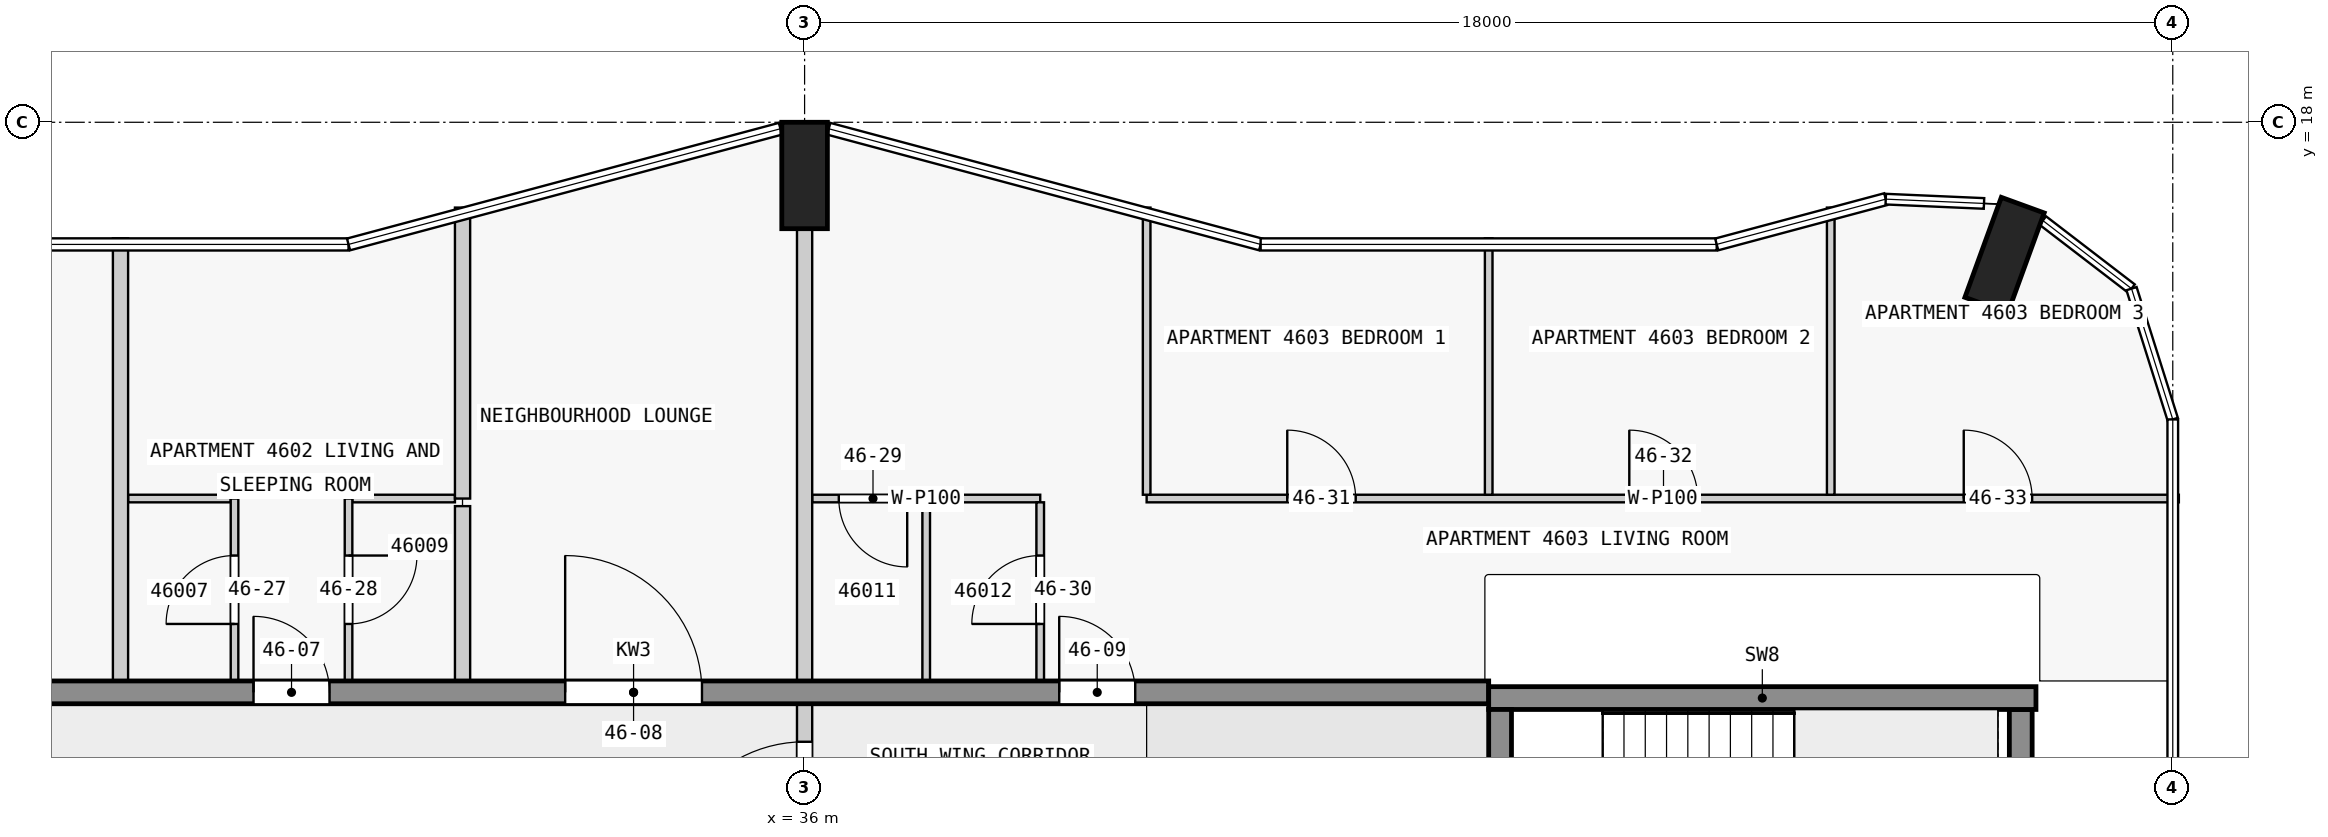
"""IFC4 building model, lengths in metres.
Left out: names, types, materials, properties, quantities, classifications, styles, units other than length and angle.
Written with IfcOpenShell. Run it as: python <this file> out.ifc"""

import sys

from ifc_helpers import new_model, si_unit, direction, frame, frame_2d, origin, origin_2d, place, context, subcontext, project, spatial, rectangle, extrude, element, fill, save


model = new_model("IFC4")
c1 = context("Model", 3, precision=1e-05, world=origin(), true_north=direction((0.0, 1.0)))
c2 = subcontext(c1, "Body", "Model", "MODEL_VIEW")
j1 = project(units=[si_unit("LENGTHUNIT", "METRE"), si_unit("PLANEANGLEUNIT", "RADIAN")], contexts=[c1])
p1 = place(None, origin())
s1 = spatial("IfcSite", under=j1, at=p1, CompositionType="ELEMENT")
p2 = place(p1, origin())
s2 = spatial("IfcBuilding", under=s1, at=p2, CompositionType="ELEMENT")
p3 = place(p2, frame((0.0, 0.0, 177.9)))
s3 = spatial("IfcBuildingStorey", under=s2, at=p3, CompositionType="ELEMENT", Elevation=177.9)
for number, where, z_axis, x_axis in (
    (1, (51.787, 16.252, 0.0), (0.0, 0.0, 1.0), (-0.94, 0.342, 0.0)),
    (2, (36.0, 17.3, 0.0), (0.0, 0.0, 1.0), (1.0, 0.0, 0.0)),
):
    element("IfcColumn", number, at=place(p3, frame(where, z_axis=z_axis, x_axis=x_axis)), inside=s3, PredefinedType="COLUMN", context=c2, shape_type="SweptSolid", body=[
        extrude(rectangle(XDim=0.6, YDim=1.4, at=origin_2d()), origin(), (0.0, 0.0, 1.0), 3.5),
    ])
p4 = place(p3, frame((45.15, 7.725, 0.0), z_axis=(0.0, 0.0, 1.0), x_axis=(0.0, 1.0, 0.0)))
e3 = element("IfcWall", 3, at=p4, inside=s3, PredefinedType="SHEAR", context=c2, shape_type="SweptSolid", body=[
    extrude(rectangle(XDim=2.55, YDim=0.3, at=frame_2d((1.275, 0.0))), origin(), (0.0, 0.0, 1.0), 3.5),
])
p5 = place(p4, frame((0.725, 0.0, 0.0)))
e4 = element("IfcOpeningElement", 4, at=p5, cuts=e3, PredefinedType="OPENING", context=c2, shape_type="SweptSolid", body=[
    extrude(rectangle(XDim=1.1, YDim=2.1, at=frame_2d((0.55, 1.05))), frame((0.0, 0.16, 0.0), z_axis=(0.0, -1.0, 0.0), x_axis=(1.0, 0.0, 0.0)), (0.0, 0.0, 1.0), 0.32),
])
p6 = place(p3, frame((52.0, 7.725, 0.0), z_axis=(0.0, 0.0, 1.0), x_axis=(0.0, 1.0, 0.0)))
e5 = element("IfcWall", 5, at=p6, inside=s3, PredefinedType="SHEAR", context=c2, shape_type="SweptSolid", body=[
    extrude(rectangle(XDim=2.55, YDim=0.3, at=frame_2d((1.275, 0.0))), origin(), (0.0, 0.0, 1.0), 3.5),
])
p7 = place(p3, frame((45.0, 10.425, 0.0), z_axis=(0.0, 0.0, 1.0), x_axis=(1.0, 0.0, 0.0)))
e6 = element("IfcWall", 6, at=p7, inside=s3, PredefinedType="SHEAR", context=c2, shape_type="SweptSolid", body=[
    extrude(rectangle(XDim=7.2, YDim=0.3, at=frame_2d((3.6, 0.0))), origin(), (0.0, 0.0, 1.0), 3.5),
])
p8 = place(p3, frame((22.5, 10.5, 0.0), z_axis=(0.0, 0.0, 1.0), x_axis=(1.0, 0.0, 0.0)))
e7 = element("IfcWall", 7, at=p8, inside=s3, PredefinedType="SHEAR", context=c2, shape_type="SweptSolid", body=[
    extrude(rectangle(XDim=22.5, YDim=0.3, at=frame_2d((11.25, 0.0))), origin(), (0.0, 0.0, 1.0), 3.25),
])
p9 = place(p8, frame((1.85, 0.0, 0.0)))
e8 = element("IfcOpeningElement", 8, at=p9, cuts=e7, PredefinedType="OPENING", context=c2, shape_type="SweptSolid", body=[
    extrude(rectangle(XDim=0.9, YDim=2.1, at=frame_2d((0.45, 1.05))), frame((0.0, 0.16, 0.0), z_axis=(0.0, -1.0, 0.0), x_axis=(1.0, 0.0, 0.0)), (0.0, 0.0, 1.0), 0.32),
])
p10 = place(p8, frame((6.25, 0.0, 0.0)))
e9 = element("IfcOpeningElement", 9, at=p10, cuts=e7, PredefinedType="OPENING", context=c2, shape_type="SweptSolid", body=[
    extrude(rectangle(XDim=1.0, YDim=2.1, at=frame_2d((0.5, 1.05))), frame((0.0, 0.16, 0.0), z_axis=(0.0, -1.0, 0.0), x_axis=(1.0, 0.0, 0.0)), (0.0, 0.0, 1.0), 0.32),
])
p11 = place(p8, frame((10.35, 0.0, 0.0)))
e10 = element("IfcOpeningElement", 10, at=p11, cuts=e7, PredefinedType="OPENING", context=c2, shape_type="SweptSolid", body=[
    extrude(rectangle(XDim=1.8, YDim=2.1, at=frame_2d((0.9, 1.05))), frame((0.0, 0.16, 0.0), z_axis=(0.0, -1.0, 0.0), x_axis=(1.0, 0.0, 0.0)), (0.0, 0.0, 1.0), 0.32),
])
p12 = place(p8, frame((16.85, 0.0, 0.0)))
e11 = element("IfcOpeningElement", 11, at=p12, cuts=e7, PredefinedType="OPENING", context=c2, shape_type="SweptSolid", body=[
    extrude(rectangle(XDim=1.0, YDim=2.1, at=frame_2d((0.5, 1.05))), frame((0.0, 0.16, 0.0), z_axis=(0.0, -1.0, 0.0), x_axis=(1.0, 0.0, 0.0)), (0.0, 0.0, 1.0), 0.32),
])
for number, where, z_axis, x_axis in (
    (12, (28.45, 13.05, 0.0), (0.0, 0.0, 1.0), (-1.0, 0.0, 0.0)),
    (13, (31.4, 13.05, 0.0), (0.0, 0.0, 1.0), (-1.0, 0.0, 0.0)),
):
    element("IfcWall", number, at=place(p3, frame(where, z_axis=z_axis, x_axis=x_axis)), inside=s3, PredefinedType="PARTITIONING", context=c2, shape_type="SweptSolid", body=[
        extrude(rectangle(XDim=1.35, YDim=0.1, at=frame_2d((0.675, 0.0))), origin(), (0.0, 0.0, 1.0), 3.25),
    ])
p13 = place(p3, frame((39.1, 13.05, 0.0), z_axis=(0.0, 0.0, 1.0), x_axis=(-1.0, 0.0, 0.0)))
e14 = element("IfcWall", 14, at=p13, inside=s3, PredefinedType="PARTITIONING", context=c2, shape_type="SweptSolid", body=[
    extrude(rectangle(XDim=3.0, YDim=0.1, at=frame_2d((1.5, 0.0))), origin(), (0.0, 0.0, 1.0), 3.25),
])
p14 = place(p13, frame((1.75, 0.0, 0.0)))
e15 = element("IfcOpeningElement", 15, at=p14, cuts=e14, PredefinedType="OPENING", context=c2, shape_type="SweptSolid", body=[
    extrude(rectangle(XDim=0.9, YDim=2.1, at=frame_2d((0.45, 1.05))), frame((0.0, 0.06, 0.0), z_axis=(0.0, -1.0, 0.0), x_axis=(1.0, 0.0, 0.0)), (0.0, 0.0, 1.0), 0.12),
])
p15 = place(p3, frame((40.5, 13.05, 0.0), z_axis=(0.0, 0.0, 1.0), x_axis=(1.0, 0.0, 0.0)))
e16 = element("IfcWall", 16, at=p15, inside=s3, PredefinedType="PARTITIONING", context=c2, shape_type="SweptSolid", body=[
    extrude(rectangle(XDim=13.58, YDim=0.1, at=frame_2d((6.79, 0.0))), origin(), (0.0, 0.0, 1.0), 3.25),
])
p16 = place(p15, frame((1.85, 0.0, 0.0)))
e17 = element("IfcOpeningElement", 17, at=p16, cuts=e16, PredefinedType="OPENING", context=c2, shape_type="SweptSolid", body=[
    extrude(rectangle(XDim=0.9, YDim=2.1, at=frame_2d((0.45, 1.05))), frame((0.0, 0.06, 0.0), z_axis=(0.0, -1.0, 0.0), x_axis=(1.0, 0.0, 0.0)), (0.0, 0.0, 1.0), 0.12),
])
p17 = place(p15, frame((6.35, 0.0, 0.0)))
e18 = element("IfcOpeningElement", 18, at=p17, cuts=e16, PredefinedType="OPENING", context=c2, shape_type="SweptSolid", body=[
    extrude(rectangle(XDim=0.9, YDim=2.1, at=frame_2d((0.45, 1.05))), frame((0.0, 0.06, 0.0), z_axis=(0.0, -1.0, 0.0), x_axis=(1.0, 0.0, 0.0)), (0.0, 0.0, 1.0), 0.12),
])
p18 = place(p15, frame((10.75, 0.0, 0.0)))
e19 = element("IfcOpeningElement", 19, at=p18, cuts=e16, PredefinedType="OPENING", context=c2, shape_type="SweptSolid", body=[
    extrude(rectangle(XDim=0.9, YDim=2.1, at=frame_2d((0.45, 1.05))), frame((0.0, 0.06, 0.0), z_axis=(0.0, -1.0, 0.0), x_axis=(1.0, 0.0, 0.0)), (0.0, 0.0, 1.0), 0.12),
])
p19 = place(p3, frame((27.0, 10.65, 0.0), z_axis=(0.0, 0.0, 1.0), x_axis=(0.0, 1.0, 0.0)))
e20 = element("IfcWall", 20, at=p19, inside=s3, PredefinedType="PARTITIONING", context=c2, shape_type="SweptSolid", body=[
    extrude(rectangle(XDim=5.823, YDim=0.2, at=frame_2d((2.912, 0.0))), origin(), (0.0, 0.0, 1.0), 3.25),
])
p20 = place(p3, frame((28.5, 10.65, 0.0), z_axis=(0.0, 0.0, 1.0), x_axis=(0.0, 1.0, 0.0)))
e21 = element("IfcWall", 21, at=p20, inside=s3, PredefinedType="PARTITIONING", context=c2, shape_type="SweptSolid", body=[
    extrude(rectangle(XDim=2.4, YDim=0.1, at=frame_2d((1.2, 0.0))), origin(), (0.0, 0.0, 1.0), 3.25),
])
p21 = place(p20, frame((0.75, 0.0, 0.0)))
e22 = element("IfcOpeningElement", 22, at=p21, cuts=e21, PredefinedType="OPENING", context=c2, shape_type="SweptSolid", body=[
    extrude(rectangle(XDim=0.9, YDim=2.1, at=frame_2d((0.45, 1.05))), frame((0.0, 0.06, 0.0), z_axis=(0.0, -1.0, 0.0), x_axis=(1.0, 0.0, 0.0)), (0.0, 0.0, 1.0), 0.12),
])
p22 = place(p3, frame((30.0, 13.05, 0.0), z_axis=(0.0, 0.0, 1.0), x_axis=(0.0, -1.0, 0.0)))
e23 = element("IfcWall", 23, at=p22, inside=s3, PredefinedType="PARTITIONING", context=c2, shape_type="SweptSolid", body=[
    extrude(rectangle(XDim=2.4, YDim=0.1, at=frame_2d((1.2, 0.0))), origin(), (0.0, 0.0, 1.0), 3.25),
])
p23 = place(p22, frame((0.75, 0.0, 0.0)))
e24 = element("IfcOpeningElement", 24, at=p23, cuts=e23, PredefinedType="OPENING", context=c2, shape_type="SweptSolid", body=[
    extrude(rectangle(XDim=0.9, YDim=2.1, at=frame_2d((0.45, 1.05))), frame((0.0, 0.06, 0.0), z_axis=(0.0, -1.0, 0.0), x_axis=(1.0, 0.0, 0.0)), (0.0, 0.0, 1.0), 0.12),
])
p24 = place(p3, frame((31.5, 16.878, 0.0), z_axis=(0.0, 0.0, 1.0), x_axis=(0.0, -1.0, 0.0)))
e25 = element("IfcWall", 25, at=p24, inside=s3, PredefinedType="PARTITIONING", context=c2, shape_type="SweptSolid", body=[
    extrude(rectangle(XDim=3.828, YDim=0.2, at=frame_2d((1.914, 0.0))), origin(), (0.0, 0.0, 1.0), 3.25),
])
p25 = place(p3, frame((31.5, 10.65, 0.0), z_axis=(0.0, 0.0, 1.0), x_axis=(0.0, 1.0, 0.0)))
e26 = element("IfcWall", 26, at=p25, inside=s3, PredefinedType="PARTITIONING", context=c2, shape_type="SweptSolid", body=[
    extrude(rectangle(XDim=2.3, YDim=0.2, at=frame_2d((1.15, 0.0))), origin(), (0.0, 0.0, 1.0), 3.25),
])
p26 = place(p3, frame((36.0, 10.65, 0.0), z_axis=(0.0, 0.0, 1.0), x_axis=(0.0, 1.0, 0.0)))
e27 = element("IfcWall", 27, at=p26, inside=s3, PredefinedType="PARTITIONING", context=c2, shape_type="SweptSolid", body=[
    extrude(rectangle(XDim=5.95, YDim=0.2, at=frame_2d((2.975, 0.0))), origin(), (0.0, 0.0, 1.0), 3.25),
])
p27 = place(p3, frame((37.6, 10.65, 0.0), z_axis=(0.0, 0.0, 1.0), x_axis=(0.0, 1.0, 0.0)))
e28 = element("IfcWall", 28, at=p27, inside=s3, PredefinedType="PARTITIONING", context=c2, shape_type="SweptSolid", body=[
    extrude(rectangle(XDim=2.35, YDim=0.1, at=frame_2d((1.175, 0.0))), origin(), (0.0, 0.0, 1.0), 3.25),
])
p28 = place(p3, frame((39.1, 10.65, 0.0), z_axis=(0.0, 0.0, 1.0), x_axis=(0.0, 1.0, 0.0)))
e29 = element("IfcWall", 29, at=p28, inside=s3, PredefinedType="PARTITIONING", context=c2, shape_type="SweptSolid", body=[
    extrude(rectangle(XDim=2.35, YDim=0.1, at=frame_2d((1.175, 0.0))), origin(), (0.0, 0.0, 1.0), 3.25),
])
p29 = place(p28, frame((0.75, 0.0, 0.0)))
e30 = element("IfcOpeningElement", 30, at=p29, cuts=e29, PredefinedType="OPENING", context=c2, shape_type="SweptSolid", body=[
    extrude(rectangle(XDim=0.9, YDim=2.1, at=frame_2d((0.45, 1.05))), frame((0.0, 0.06, 0.0), z_axis=(0.0, -1.0, 0.0), x_axis=(1.0, 0.0, 0.0)), (0.0, 0.0, 1.0), 0.12),
])
p30 = place(p3, frame((40.5, 16.878, 0.0), z_axis=(0.0, 0.0, 1.0), x_axis=(0.0, -1.0, 0.0)))
e31 = element("IfcWall", 31, at=p30, inside=s3, PredefinedType="PARTITIONING", context=c2, shape_type="SweptSolid", body=[
    extrude(rectangle(XDim=3.778, YDim=0.1, at=frame_2d((1.889, 0.0))), origin(), (0.0, 0.0, 1.0), 3.25),
])
p31 = place(p3, frame((45.0, 13.1, 0.0), z_axis=(0.0, 0.0, 1.0), x_axis=(0.0, 1.0, 0.0)))
e32 = element("IfcWall", 32, at=p31, inside=s3, PredefinedType="PARTITIONING", context=c2, shape_type="SweptSolid", body=[
    extrude(rectangle(XDim=3.373, YDim=0.1, at=frame_2d((1.687, 0.0))), origin(), (0.0, 0.0, 1.0), 3.25),
])
p32 = place(p3, frame((49.5, 13.1, 0.0), z_axis=(0.0, 0.0, 1.0), x_axis=(0.0, 1.0, 0.0)))
e33 = element("IfcWall", 33, at=p32, inside=s3, PredefinedType="PARTITIONING", context=c2, shape_type="SweptSolid", body=[
    extrude(rectangle(XDim=3.778, YDim=0.1, at=frame_2d((1.889, 0.0))), origin(), (0.0, 0.0, 1.0), 3.25),
])
p33 = place(p3, frame((36.0, 7.35, 0.0), z_axis=(0.0, 0.0, 1.0), x_axis=(0.0, 1.0, 0.0)))
e34 = element("IfcWall", 34, at=p33, inside=s3, PredefinedType="PARTITIONING", context=c2, shape_type="SweptSolid", body=[
    extrude(rectangle(XDim=3.2, YDim=0.2, at=frame_2d((1.6, 0.0))), origin(), (0.0, 0.0, 1.0), 3.25),
])
p34 = place(p33, frame((0.7, 0.0, 0.0)))
e35 = element("IfcOpeningElement", 35, at=p34, cuts=e34, PredefinedType="OPENING", context=c2, shape_type="SweptSolid", body=[
    extrude(rectangle(XDim=1.8, YDim=2.1, at=frame_2d((0.9, 1.05))), frame((0.0, 0.11, 0.0), z_axis=(0.0, -1.0, 0.0), x_axis=(1.0, 0.0, 0.0)), (0.0, 0.0, 1.0), 0.22),
])
p35 = place(p10, origin())
e36 = element("IfcDoor", 36, at=p35, inside=s3, OperationType="SINGLE_SWING_LEFT", PredefinedType="DOOR", context=c2, shape_type="SweptSolid", body=[
    extrude(rectangle(XDim=1.0, YDim=2.1, at=frame_2d((0.5, 1.05))), frame((0.0, 0.025, 0.0), z_axis=(0.0, -1.0, 0.0), x_axis=(1.0, 0.0, 0.0)), (0.0, 0.0, 1.0), 0.05),
])
fill(e9, e36)
p36 = place(p11, origin())
e37 = element("IfcDoor", 37, at=p36, inside=s3, OperationType="SINGLE_SWING_LEFT", PredefinedType="DOOR", context=c2, shape_type="SweptSolid", body=[
    extrude(rectangle(XDim=1.8, YDim=2.1, at=frame_2d((0.9, 1.05))), frame((0.0, 0.025, 0.0), z_axis=(0.0, -1.0, 0.0), x_axis=(1.0, 0.0, 0.0)), (0.0, 0.0, 1.0), 0.05),
])
fill(e10, e37)
p37 = place(p12, origin())
e38 = element("IfcDoor", 38, at=p37, inside=s3, OperationType="SINGLE_SWING_RIGHT", PredefinedType="DOOR", context=c2, shape_type="SweptSolid", body=[
    extrude(rectangle(XDim=1.0, YDim=2.1, at=frame_2d((0.5, 1.05))), frame((0.0, 0.025, 0.0), z_axis=(0.0, -1.0, 0.0), x_axis=(1.0, 0.0, 0.0)), (0.0, 0.0, 1.0), 0.05),
])
fill(e11, e38)
p38 = place(p34, origin())
e39 = element("IfcDoor", 39, at=p38, inside=s3, OperationType="SINGLE_SWING_LEFT", PredefinedType="DOOR", context=c2, shape_type="SweptSolid", body=[
    extrude(rectangle(XDim=1.8, YDim=2.1, at=frame_2d((0.9, 1.05))), frame((0.0, 0.025, 0.0), z_axis=(0.0, -1.0, 0.0), x_axis=(1.0, 0.0, 0.0)), (0.0, 0.0, 1.0), 0.05),
])
fill(e35, e39)
p39 = place(p21, origin())
e40 = element("IfcDoor", 40, at=p39, inside=s3, OperationType="SINGLE_SWING_LEFT", PredefinedType="DOOR", context=c2, shape_type="SweptSolid", body=[
    extrude(rectangle(XDim=0.9, YDim=2.1, at=frame_2d((0.45, 1.05))), frame((0.0, 0.025, 0.0), z_axis=(0.0, -1.0, 0.0), x_axis=(1.0, 0.0, 0.0)), (0.0, 0.0, 1.0), 0.05),
])
fill(e22, e40)
p40 = place(p23, origin())
e41 = element("IfcDoor", 41, at=p40, inside=s3, OperationType="SINGLE_SWING_LEFT", PredefinedType="DOOR", context=c2, shape_type="SweptSolid", body=[
    extrude(rectangle(XDim=0.9, YDim=2.1, at=frame_2d((0.45, 1.05))), frame((0.0, 0.025, 0.0), z_axis=(0.0, -1.0, 0.0), x_axis=(1.0, 0.0, 0.0)), (0.0, 0.0, 1.0), 0.05),
])
fill(e24, e41)
p41 = place(p14, origin())
e42 = element("IfcDoor", 42, at=p41, inside=s3, OperationType="SINGLE_SWING_RIGHT", PredefinedType="DOOR", context=c2, shape_type="SweptSolid", body=[
    extrude(rectangle(XDim=0.9, YDim=2.1, at=frame_2d((0.45, 1.05))), frame((0.0, 0.025, 0.0), z_axis=(0.0, -1.0, 0.0), x_axis=(1.0, 0.0, 0.0)), (0.0, 0.0, 1.0), 0.05),
])
fill(e15, e42)
p42 = place(p29, origin())
e43 = element("IfcDoor", 43, at=p42, inside=s3, OperationType="SINGLE_SWING_RIGHT", PredefinedType="DOOR", context=c2, shape_type="SweptSolid", body=[
    extrude(rectangle(XDim=0.9, YDim=2.1, at=frame_2d((0.45, 1.05))), frame((0.0, 0.025, 0.0), z_axis=(0.0, -1.0, 0.0), x_axis=(1.0, 0.0, 0.0)), (0.0, 0.0, 1.0), 0.05),
])
fill(e30, e43)
p43 = place(p16, origin())
e44 = element("IfcDoor", 44, at=p43, inside=s3, OperationType="SINGLE_SWING_LEFT", PredefinedType="DOOR", context=c2, shape_type="SweptSolid", body=[
    extrude(rectangle(XDim=0.9, YDim=2.1, at=frame_2d((0.45, 1.05))), frame((0.0, 0.025, 0.0), z_axis=(0.0, -1.0, 0.0), x_axis=(1.0, 0.0, 0.0)), (0.0, 0.0, 1.0), 0.05),
])
fill(e17, e44)
p44 = place(p17, origin())
e45 = element("IfcDoor", 45, at=p44, inside=s3, OperationType="SINGLE_SWING_RIGHT", PredefinedType="DOOR", context=c2, shape_type="SweptSolid", body=[
    extrude(rectangle(XDim=0.9, YDim=2.1, at=frame_2d((0.45, 1.05))), frame((0.0, 0.025, 0.0), z_axis=(0.0, -1.0, 0.0), x_axis=(1.0, 0.0, 0.0)), (0.0, 0.0, 1.0), 0.05),
])
fill(e18, e45)
p45 = place(p18, origin())
e46 = element("IfcDoor", 46, at=p45, inside=s3, OperationType="SINGLE_SWING_RIGHT", PredefinedType="DOOR", context=c2, shape_type="SweptSolid", body=[
    extrude(rectangle(XDim=0.9, YDim=2.1, at=frame_2d((0.45, 1.05))), frame((0.0, 0.025, 0.0), z_axis=(0.0, -1.0, 0.0), x_axis=(1.0, 0.0, 0.0)), (0.0, 0.0, 1.0), 0.05),
])
fill(e19, e46)
save(model, sys.argv[1])
